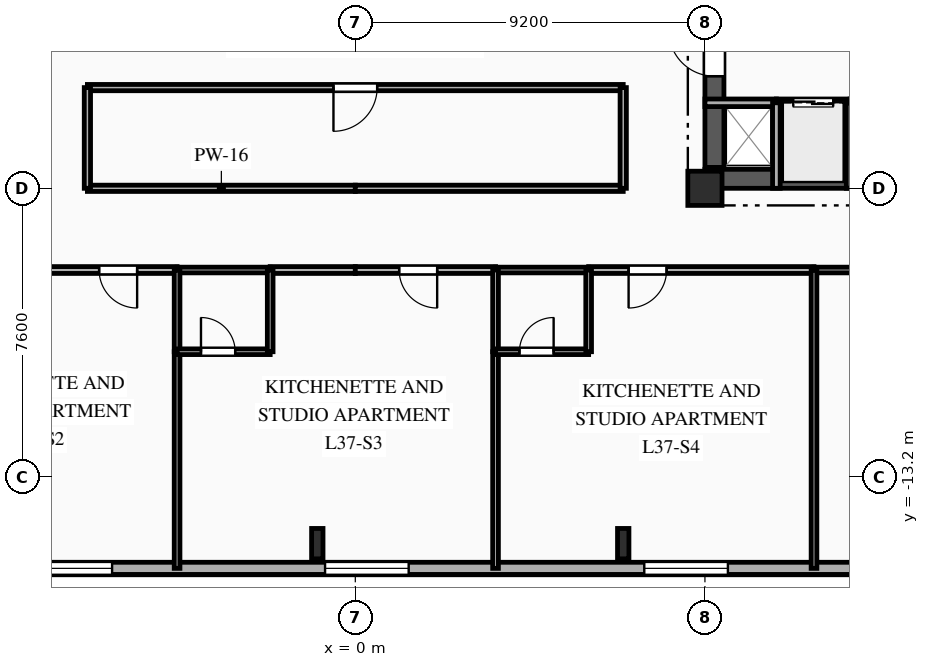
"""IFC4 building model, lengths in metres.
Left out: names, types, materials, properties, quantities, classifications, styles, units other than length and angle.
Written with IfcOpenShell. Run it as: python <this file> out.ifc"""

import sys

from ifc_helpers import new_model, si_unit, direction, frame, frame_2d, origin, origin_2d, place, context, subcontext, project, spatial, rectangle, i_section, extrude, element, fill, save


model = new_model("IFC4")
c1 = context("Model", 3, precision=1e-05, world=origin(), true_north=direction((0.0, 1.0)))
c2 = subcontext(c1, "Body", "Model", "MODEL_VIEW")
j1 = project(units=[si_unit("LENGTHUNIT", "METRE"), si_unit("PLANEANGLEUNIT", "RADIAN")], contexts=[c1])
p1 = place(None, origin())
s1 = spatial("IfcSite", under=j1, at=p1, CompositionType="ELEMENT")
p2 = place(p1, origin())
s2 = spatial("IfcBuilding", under=s1, at=p2, CompositionType="ELEMENT")
p3 = place(p2, frame((0.0, 0.0, 134.35)))
s3 = spatial("IfcBuildingStorey", under=s2, at=p3, CompositionType="ELEMENT", Elevation=134.35)
p4 = place(p3, frame((9.2, -5.6, 0.0), z_axis=(0.0, 0.0, 1.0), x_axis=(1.0, 0.0, 0.0)))
e1 = element("IfcColumn", 1, at=p4, inside=s3, PredefinedType="COLUMN", context=c2, shape_type="SweptSolid", body=[
    extrude(rectangle(XDim=0.9, YDim=0.9, at=origin_2d()), origin(), (0.0, 0.0, 1.0), 3.35),
])
for number, where, z_axis, x_axis in (
    (2, (-1.0, -14.95, 0.0), (0.0, 0.0, 1.0), (1.0, 0.0, 0.0)),
    (3, (7.05, -14.95, 0.0), (0.0, 0.0, 1.0), (1.0, 0.0, 0.0)),
):
    element("IfcColumn", number, at=place(p3, frame(where, z_axis=z_axis, x_axis=x_axis)), inside=s3, PredefinedType="COLUMN", context=c2, shape_type="SweptSolid", body=[
        extrude(i_section(OverallWidth=0.3, OverallDepth=0.8, WebThickness=0.018, FlangeThickness=0.033, FilletRadius=0.03, at=origin_2d()), origin(), (0.0, 0.0, 1.0), 3.35),
    ])
p5 = place(p3, frame((23.8, -15.6, 0.0), z_axis=(0.0, 0.0, 1.0), x_axis=(-1.0, 0.0, 0.0)))
e4 = element("IfcWall", 4, at=p5, inside=s3, PredefinedType="SOLIDWALL", context=c2, shape_type="SweptSolid", body=[
    extrude(rectangle(XDim=49.6, YDim=0.32, at=frame_2d((24.8, 0.0))), origin(), (0.0, 0.0, 1.0), 3.04),
])
p6 = place(p5, frame((1.13, 0.0, 0.85)))
e5 = element("IfcOpeningElement", 5, at=p6, cuts=e4, PredefinedType="OPENING", context=c2, shape_type="SweptSolid", body=[
    extrude(rectangle(XDim=1.1, YDim=1.85, at=frame_2d((0.55, 0.925))), frame((0.0, 0.17, 0.0), z_axis=(0.0, -1.0, 0.0), x_axis=(1.0, 0.0, 0.0)), (0.0, 0.0, 1.0), 0.34),
])
p7 = place(p5, frame((6.495, 0.0, 0.85)))
e6 = element("IfcOpeningElement", 6, at=p7, cuts=e4, PredefinedType="OPENING", context=c2, shape_type="SweptSolid", body=[
    extrude(rectangle(XDim=1.65, YDim=1.85, at=frame_2d((0.825, 0.925))), frame((0.0, 0.17, 0.0), z_axis=(0.0, -1.0, 0.0), x_axis=(1.0, 0.0, 0.0)), (0.0, 0.0, 1.0), 0.34),
])
p8 = place(p5, frame((13.996, 0.0, 0.85)))
e7 = element("IfcOpeningElement", 7, at=p8, cuts=e4, PredefinedType="OPENING", context=c2, shape_type="SweptSolid", body=[
    extrude(rectangle(XDim=2.2, YDim=1.85, at=frame_2d((1.1, 0.925))), frame((0.0, 0.17, 0.0), z_axis=(0.0, -1.0, 0.0), x_axis=(1.0, 0.0, 0.0)), (0.0, 0.0, 1.0), 0.34),
])
p9 = place(p5, frame((22.396, 0.0, 0.85)))
e8 = element("IfcOpeningElement", 8, at=p9, cuts=e4, PredefinedType="OPENING", context=c2, shape_type="SweptSolid", body=[
    extrude(rectangle(XDim=2.2, YDim=1.85, at=frame_2d((1.1, 0.925))), frame((0.0, 0.17, 0.0), z_axis=(0.0, -1.0, 0.0), x_axis=(1.0, 0.0, 0.0)), (0.0, 0.0, 1.0), 0.34),
])
p10 = place(p5, frame((30.2, 0.0, 0.85)))
e9 = element("IfcOpeningElement", 9, at=p10, cuts=e4, PredefinedType="OPENING", context=c2, shape_type="SweptSolid", body=[
    extrude(rectangle(XDim=2.2, YDim=1.85, at=frame_2d((1.1, 0.925))), frame((0.0, 0.17, 0.0), z_axis=(0.0, -1.0, 0.0), x_axis=(1.0, 0.0, 0.0)), (0.0, 0.0, 1.0), 0.34),
])
p11 = place(p5, frame((38.673, 0.0, 0.85)))
e10 = element("IfcOpeningElement", 10, at=p11, cuts=e4, PredefinedType="OPENING", context=c2, shape_type="SweptSolid", body=[
    extrude(rectangle(XDim=1.65, YDim=1.85, at=frame_2d((0.825, 0.925))), frame((0.0, 0.17, 0.0), z_axis=(0.0, -1.0, 0.0), x_axis=(1.0, 0.0, 0.0)), (0.0, 0.0, 1.0), 0.34),
])
p12 = place(p5, frame((46.175, 0.0, 0.85)))
e11 = element("IfcOpeningElement", 11, at=p12, cuts=e4, PredefinedType="OPENING", context=c2, shape_type="SweptSolid", body=[
    extrude(rectangle(XDim=1.65, YDim=1.85, at=frame_2d((0.825, 0.925))), frame((0.0, 0.17, 0.0), z_axis=(0.0, -1.0, 0.0), x_axis=(1.0, 0.0, 0.0)), (0.0, 0.0, 1.0), 0.34),
])
p13 = place(p3, frame((9.2, -5.35, 0.0), z_axis=(0.0, 0.0, 1.0), x_axis=(1.0, 0.0, 0.0)))
e12 = element("IfcWall", 12, at=p13, inside=s3, PredefinedType="SHEAR", context=c2, shape_type="SweptSolid", body=[
    extrude(rectangle(XDim=9.6, YDim=0.5, at=frame_2d((4.8, 0.0))), origin(), (0.0, 0.0, 1.0), 3.04),
])
p14 = place(p13, frame((7.65, 0.0, 0.0)))
e13 = element("IfcOpeningElement", 13, at=p14, cuts=e12, PredefinedType="OPENING", context=c2, shape_type="SweptSolid", body=[
    extrude(rectangle(XDim=0.9, YDim=2.1, at=frame_2d((0.45, 1.05))), frame((0.0, 0.26, 0.0), z_axis=(0.0, -1.0, 0.0), x_axis=(1.0, 0.0, 0.0)), (0.0, 0.0, 1.0), 0.52),
])
p15 = place(p3, frame((9.45, -5.05, 0.0), z_axis=(0.0, 0.0, 1.0), x_axis=(0.0, 1.0, 0.0)))
e14 = element("IfcWall", 14, at=p15, inside=s3, PredefinedType="SHEAR", context=c2, shape_type="SweptSolid", body=[
    extrude(rectangle(XDim=10.1, YDim=0.5, at=frame_2d((5.05, 0.0))), origin(), (0.0, 0.0, 1.0), 3.04),
])
p16 = place(p15, frame((7.15, 0.0, 0.0)))
e15 = element("IfcOpeningElement", 15, at=p16, cuts=e14, PredefinedType="OPENING", context=c2, shape_type="SweptSolid", body=[
    extrude(rectangle(XDim=0.9, YDim=2.1, at=frame_2d((0.45, 1.05))), frame((0.0, 0.26, 0.0), z_axis=(0.0, -1.0, 0.0), x_axis=(1.0, 0.0, 0.0)), (0.0, 0.0, 1.0), 0.52),
])
p17 = place(p15, frame((2.4, 0.0, 0.0)))
e16 = element("IfcOpeningElement", 16, at=p17, cuts=e14, PredefinedType="OPENING", context=c2, shape_type="SweptSolid", body=[
    extrude(rectangle(XDim=1.2, YDim=2.15, at=frame_2d((0.6, 1.075))), frame((0.0, 0.26, 0.0), z_axis=(0.0, -1.0, 0.0), x_axis=(1.0, 0.0, 0.0)), (0.0, 0.0, 1.0), 0.52),
])
p18 = place(p3, frame((9.2, -3.35, 0.0), z_axis=(0.0, 0.0, 1.0), x_axis=(1.0, 0.0, 0.0)))
e17 = element("IfcWall", 17, at=p18, inside=s3, PredefinedType="PARTITIONING", context=c2, shape_type="SweptSolid", body=[
    extrude(rectangle(XDim=1.88, YDim=0.2, at=frame_2d((0.94, 0.0))), origin(), (0.0, 0.0, 1.0), 2.755),
])
p19 = place(p3, frame((11.08, -3.35, 0.0), z_axis=(0.0, 0.0, 1.0), x_axis=(1.0, 0.0, 0.0)))
e18 = element("IfcWall", 18, at=p19, inside=s3, PredefinedType="PARTITIONING", context=c2, shape_type="SweptSolid", body=[
    extrude(rectangle(XDim=1.94, YDim=0.2, at=frame_2d((0.97, 0.0))), origin(), (0.0, 0.0, 1.0), 3.04),
])
p20 = place(p19, frame((0.445, 0.0, 0.0)))
e19 = element("IfcOpeningElement", 19, at=p20, cuts=e18, PredefinedType="OPENING", context=c2, shape_type="SweptSolid", body=[
    extrude(rectangle(XDim=1.05, YDim=2.1, at=frame_2d((0.525, 1.05))), frame((0.0, 0.11, 0.0), z_axis=(0.0, -1.0, 0.0), x_axis=(1.0, 0.0, 0.0)), (0.0, 0.0, 1.0), 0.22),
])
for number, where, z_axis, x_axis in (
    (20, (11.08, -5.6, 0.0), (0.0, 0.0, 1.0), (0.0, 1.0, 0.0)),
    (21, (13.02, -5.6, 0.0), (0.0, 0.0, 1.0), (0.0, 1.0, 0.0)),
):
    element("IfcWall", number, at=place(p3, frame(where, z_axis=z_axis, x_axis=x_axis)), inside=s3, PredefinedType="PARTITIONING", context=c2, shape_type="SweptSolid", body=[
        extrude(rectangle(XDim=2.25, YDim=0.2, at=frame_2d((1.125, 0.0))), origin(), (0.0, 0.0, 1.0), 3.04),
    ])
p21 = place(p3, frame((-4.69, -7.75, 0.0), z_axis=(0.0, 0.0, 1.0), x_axis=(-1.0, 0.0, 0.0)))
e22 = element("IfcWall", 22, at=p21, inside=s3, PredefinedType="PARTITIONING", context=c2, shape_type="SweptSolid", body=[
    extrude(rectangle(XDim=5.93, YDim=0.18, at=frame_2d((2.965, 0.0))), origin(), (0.0, 0.0, 1.0), 3.04),
])
p22 = place(p21, frame((1.051, 0.0, 0.0)))
e23 = element("IfcOpeningElement", 23, at=p22, cuts=e22, PredefinedType="OPENING", context=c2, shape_type="SweptSolid", body=[
    extrude(rectangle(XDim=1.0, YDim=2.15, at=frame_2d((0.5, 1.075))), frame((0.0, 0.1, 0.0), z_axis=(0.0, -1.0, 0.0), x_axis=(1.0, 0.0, 0.0)), (0.0, 0.0, 1.0), 0.2),
])
p23 = place(p3, frame((0.0, -7.75, 0.0), z_axis=(0.0, 0.0, 1.0), x_axis=(-1.0, 0.0, 0.0)))
e24 = element("IfcWall", 24, at=p23, inside=s3, PredefinedType="PARTITIONING", context=c2, shape_type="SweptSolid", body=[
    extrude(rectangle(XDim=2.24, YDim=0.18, at=frame_2d((1.12, 0.0))), origin(), (0.0, 0.0, 1.0), 3.04),
])
p24 = place(p3, frame((-2.24, -7.75, 0.0), z_axis=(0.0, 0.0, 1.0), x_axis=(-1.0, 0.0, 0.0)))
e25 = element("IfcWall", 25, at=p24, inside=s3, PredefinedType="PLUMBINGWALL", context=c2, shape_type="SweptSolid", body=[
    extrude(rectangle(XDim=2.45, YDim=0.15, at=frame_2d((1.225, 0.0))), origin(), (0.0, 0.0, 1.0), 3.04),
])
p25 = place(p3, frame((-7.05, -5.6, 0.0), z_axis=(0.0, 0.0, 1.0), x_axis=(1.0, 0.0, 0.0)))
e26 = element("IfcWall", 26, at=p25, inside=s3, PredefinedType="PARTITIONING", context=c2, shape_type="SweptSolid", body=[
    extrude(rectangle(XDim=7.05, YDim=0.165, at=frame_2d((3.525, 0.0))), origin(), (0.0, 0.0, 1.0), 2.525),
])
p26 = place(p3, frame((3.69, -7.75, 0.0), z_axis=(0.0, 0.0, 1.0), x_axis=(-1.0, 0.0, 0.0)))
e27 = element("IfcWall", 27, at=p26, inside=s3, PredefinedType="PARTITIONING", context=c2, shape_type="SweptSolid", body=[
    extrude(rectangle(XDim=3.69, YDim=0.18, at=frame_2d((1.845, 0.0))), origin(), (0.0, 0.0, 1.0), 3.04),
])
p27 = place(p26, frame((1.536, 0.0, 0.0)))
e28 = element("IfcOpeningElement", 28, at=p27, cuts=e27, PredefinedType="OPENING", context=c2, shape_type="SweptSolid", body=[
    extrude(rectangle(XDim=1.0, YDim=2.15, at=frame_2d((0.5, 1.075))), frame((0.0, 0.1, 0.0), z_axis=(0.0, -1.0, 0.0), x_axis=(1.0, 0.0, 0.0)), (0.0, 0.0, 1.0), 0.2),
])
p28 = place(p3, frame((12.07, -7.75, 0.0), z_axis=(0.0, 0.0, 1.0), x_axis=(-1.0, 0.0, 0.0)))
e29 = element("IfcWall", 29, at=p28, inside=s3, PredefinedType="PARTITIONING", context=c2, shape_type="SweptSolid", body=[
    extrude(rectangle(XDim=5.93, YDim=0.18, at=frame_2d((2.965, 0.0))), origin(), (0.0, 0.0, 1.0), 3.04),
])
p29 = place(p28, frame((3.879, 0.0, 0.0)))
e30 = element("IfcOpeningElement", 30, at=p29, cuts=e29, PredefinedType="OPENING", context=c2, shape_type="SweptSolid", body=[
    extrude(rectangle(XDim=1.0, YDim=2.15, at=frame_2d((0.5, 1.075))), frame((0.0, 0.1, 0.0), z_axis=(0.0, -1.0, 0.0), x_axis=(1.0, 0.0, 0.0)), (0.0, 0.0, 1.0), 0.2),
])
p30 = place(p3, frame((6.14, -7.75, 0.0), z_axis=(0.0, 0.0, 1.0), x_axis=(-1.0, 0.0, 0.0)))
e31 = element("IfcWall", 31, at=p30, inside=s3, PredefinedType="PLUMBINGWALL", context=c2, shape_type="SweptSolid", body=[
    extrude(rectangle(XDim=2.45, YDim=0.15, at=frame_2d((1.225, 0.0))), origin(), (0.0, 0.0, 1.0), 3.04),
])
p31 = place(p3, frame((20.95, -7.75, 0.0), z_axis=(0.0, 0.0, 1.0), x_axis=(-1.0, 0.0, 0.0)))
e32 = element("IfcWall", 32, at=p31, inside=s3, PredefinedType="PARTITIONING", context=c2, shape_type="SweptSolid", body=[
    extrude(rectangle(XDim=8.88, YDim=0.15, at=frame_2d((4.44, 0.0))), origin(), (0.0, 0.0, 1.0), 3.04),
])
p32 = place(p31, frame((6.416, 0.0, 0.0)))
e33 = element("IfcOpeningElement", 33, at=p32, cuts=e32, PredefinedType="OPENING", context=c2, shape_type="SweptSolid", body=[
    extrude(rectangle(XDim=1.05, YDim=2.15, at=frame_2d((0.525, 1.075))), frame((0.0, 0.085, 0.0), z_axis=(0.0, -1.0, 0.0), x_axis=(1.0, 0.0, 0.0)), (0.0, 0.0, 1.0), 0.17),
])
p33 = place(p3, frame((0.0, -5.6, 0.0), z_axis=(0.0, 0.0, 1.0), x_axis=(1.0, 0.0, 0.0)))
e34 = element("IfcWall", 34, at=p33, inside=s3, PredefinedType="PARTITIONING", context=c2, shape_type="SweptSolid", body=[
    extrude(rectangle(XDim=7.05, YDim=0.165, at=frame_2d((3.525, 0.0))), origin(), (0.0, 0.0, 1.0), 2.525),
])
p34 = place(p3, frame((7.05, -2.95, 0.0), z_axis=(0.0, 0.0, 1.0), x_axis=(-1.0, 0.0, 0.0)))
e35 = element("IfcWall", 35, at=p34, inside=s3, PredefinedType="PARTITIONING", context=c2, shape_type="SweptSolid", body=[
    extrude(rectangle(XDim=14.1, YDim=0.165, at=frame_2d((7.05, 0.0))), origin(), (0.0, 0.0, 1.0), 3.04),
])
p35 = place(p34, frame((6.475, 0.0, 0.0)))
e36 = element("IfcOpeningElement", 36, at=p35, cuts=e35, PredefinedType="OPENING", context=c2, shape_type="SweptSolid", body=[
    extrude(rectangle(XDim=1.15, YDim=2.15, at=frame_2d((0.575, 1.075))), frame((0.0, 0.093, 0.0), z_axis=(0.0, -1.0, 0.0), x_axis=(1.0, 0.0, 0.0)), (0.0, 0.0, 1.0), 0.185),
])
for number, where, z_axis, x_axis in (
    (37, (-7.05, -2.95, 0.0), (0.0, 0.0, 1.0), (0.0, -1.0, 0.0)),
    (38, (7.05, -5.6, 0.0), (0.0, 0.0, 1.0), (0.0, 1.0, 0.0)),
):
    element("IfcWall", number, at=place(p3, frame(where, z_axis=z_axis, x_axis=x_axis)), inside=s3, PredefinedType="PARTITIONING", context=c2, shape_type="SweptSolid", body=[
        extrude(rectangle(XDim=2.65, YDim=0.165, at=frame_2d((1.325, 0.0))), origin(), (0.0, 0.0, 1.0), 3.04),
    ])
p36 = place(p3, frame((-4.69, -9.9, 0.0), z_axis=(0.0, 0.0, 1.0), x_axis=(0.0, -1.0, 0.0)))
e39 = element("IfcWall", 39, at=p36, inside=s3, PredefinedType="PARTITIONING", context=c2, shape_type="SweptSolid", body=[
    extrude(rectangle(XDim=5.7, YDim=0.15, at=frame_2d((2.85, 0.0))), origin(), (0.0, 0.0, 1.0), 3.04),
])
p37 = place(p3, frame((-4.69, -7.75, 0.0), z_axis=(0.0, 0.0, 1.0), x_axis=(0.0, -1.0, 0.0)))
e40 = element("IfcWall", 40, at=p37, inside=s3, PredefinedType="PLUMBINGWALL", context=c2, shape_type="SweptSolid", body=[
    extrude(rectangle(XDim=2.15, YDim=0.15, at=frame_2d((1.075, 0.0))), origin(), (0.0, 0.0, 1.0), 3.04),
])
p38 = place(p3, frame((-4.69, -9.9, 0.0), z_axis=(0.0, 0.0, 1.0), x_axis=(1.0, 0.0, 0.0)))
e41 = element("IfcWall", 41, at=p38, inside=s3, PredefinedType="PLUMBINGWALL", context=c2, shape_type="SweptSolid", body=[
    extrude(rectangle(XDim=2.45, YDim=0.15, at=frame_2d((1.225, 0.0))), origin(), (0.0, 0.0, 1.0), 3.04),
])
p39 = place(p38, frame((0.629, 0.0, 0.0)))
e42 = element("IfcOpeningElement", 42, at=p39, cuts=e41, PredefinedType="OPENING", context=c2, shape_type="SweptSolid", body=[
    extrude(rectangle(XDim=0.9, YDim=2.1, at=frame_2d((0.45, 1.05))), frame((0.0, 0.085, 0.0), z_axis=(0.0, -1.0, 0.0), x_axis=(1.0, 0.0, 0.0)), (0.0, 0.0, 1.0), 0.17),
])
p40 = place(p3, frame((-2.24, -9.9, 0.0), z_axis=(0.0, 0.0, 1.0), x_axis=(0.0, 1.0, 0.0)))
e43 = element("IfcWall", 43, at=p40, inside=s3, PredefinedType="PLUMBINGWALL", context=c2, shape_type="SweptSolid", body=[
    extrude(rectangle(XDim=2.15, YDim=0.15, at=frame_2d((1.075, 0.0))), origin(), (0.0, 0.0, 1.0), 3.04),
])
p41 = place(p3, frame((3.69, -9.9, 0.0), z_axis=(0.0, 0.0, 1.0), x_axis=(0.0, -1.0, 0.0)))
e44 = element("IfcWall", 44, at=p41, inside=s3, PredefinedType="PARTITIONING", context=c2, shape_type="SweptSolid", body=[
    extrude(rectangle(XDim=5.7, YDim=0.15, at=frame_2d((2.85, 0.0))), origin(), (0.0, 0.0, 1.0), 3.04),
])
p42 = place(p3, frame((3.69, -7.75, 0.0), z_axis=(0.0, 0.0, 1.0), x_axis=(0.0, -1.0, 0.0)))
e45 = element("IfcWall", 45, at=p42, inside=s3, PredefinedType="PLUMBINGWALL", context=c2, shape_type="SweptSolid", body=[
    extrude(rectangle(XDim=2.15, YDim=0.15, at=frame_2d((1.075, 0.0))), origin(), (0.0, 0.0, 1.0), 3.04),
])
p43 = place(p3, frame((3.69, -9.9, 0.0), z_axis=(0.0, 0.0, 1.0), x_axis=(1.0, 0.0, 0.0)))
e46 = element("IfcWall", 46, at=p43, inside=s3, PredefinedType="PLUMBINGWALL", context=c2, shape_type="SweptSolid", body=[
    extrude(rectangle(XDim=2.45, YDim=0.15, at=frame_2d((1.225, 0.0))), origin(), (0.0, 0.0, 1.0), 3.04),
])
p44 = place(p43, frame((0.629, 0.0, 0.0)))
e47 = element("IfcOpeningElement", 47, at=p44, cuts=e46, PredefinedType="OPENING", context=c2, shape_type="SweptSolid", body=[
    extrude(rectangle(XDim=0.9, YDim=2.1, at=frame_2d((0.45, 1.05))), frame((0.0, 0.085, 0.0), z_axis=(0.0, -1.0, 0.0), x_axis=(1.0, 0.0, 0.0)), (0.0, 0.0, 1.0), 0.17),
])
p45 = place(p3, frame((6.14, -9.9, 0.0), z_axis=(0.0, 0.0, 1.0), x_axis=(0.0, 1.0, 0.0)))
e48 = element("IfcWall", 48, at=p45, inside=s3, PredefinedType="PLUMBINGWALL", context=c2, shape_type="SweptSolid", body=[
    extrude(rectangle(XDim=2.15, YDim=0.15, at=frame_2d((1.075, 0.0))), origin(), (0.0, 0.0, 1.0), 3.04),
])
p46 = place(p3, frame((12.07, -7.75, 0.0), z_axis=(0.0, 0.0, 1.0), x_axis=(0.0, -1.0, 0.0)))
e49 = element("IfcWall", 49, at=p46, inside=s3, PredefinedType="PARTITIONING", context=c2, shape_type="SweptSolid", body=[
    extrude(rectangle(XDim=7.85, YDim=0.15, at=frame_2d((3.925, 0.0))), origin(), (0.0, 0.0, 1.0), 3.04),
])
p47 = place(p8, origin())
e50 = element("IfcWindow", 50, at=p47, inside=s3, PartitioningType="SINGLE_PANEL", PredefinedType="WINDOW", context=c2, shape_type="SweptSolid", body=[
    extrude(rectangle(XDim=2.2, YDim=1.85, at=frame_2d((1.1, 0.925))), frame((0.0, 0.03, 0.0), z_axis=(0.0, -1.0, 0.0), x_axis=(1.0, 0.0, 0.0)), (0.0, 0.0, 1.0), 0.06),
])
fill(e7, e50)
p48 = place(p9, origin())
e51 = element("IfcWindow", 51, at=p48, inside=s3, PartitioningType="SINGLE_PANEL", PredefinedType="WINDOW", context=c2, shape_type="SweptSolid", body=[
    extrude(rectangle(XDim=2.2, YDim=1.85, at=frame_2d((1.1, 0.925))), frame((0.0, 0.03, 0.0), z_axis=(0.0, -1.0, 0.0), x_axis=(1.0, 0.0, 0.0)), (0.0, 0.0, 1.0), 0.06),
])
fill(e8, e51)
p49 = place(p10, origin())
e52 = element("IfcWindow", 52, at=p49, inside=s3, PartitioningType="SINGLE_PANEL", PredefinedType="WINDOW", context=c2, shape_type="SweptSolid", body=[
    extrude(rectangle(XDim=2.2, YDim=1.85, at=frame_2d((1.1, 0.925))), frame((0.0, 0.03, 0.0), z_axis=(0.0, -1.0, 0.0), x_axis=(1.0, 0.0, 0.0)), (0.0, 0.0, 1.0), 0.06),
])
fill(e9, e52)
p50 = place(p20, origin())
e53 = element("IfcDoor", 53, at=p50, inside=s3, OperationType="DOUBLE_DOOR_SLIDING", PredefinedType="DOOR", context=c2, shape_type="SweptSolid", body=[
    extrude(rectangle(XDim=1.05, YDim=2.1, at=frame_2d((0.525, 1.05))), frame((0.0, 0.025, 0.0), z_axis=(0.0, -1.0, 0.0), x_axis=(1.0, 0.0, 0.0)), (0.0, 0.0, 1.0), 0.05),
])
fill(e19, e53)
p51 = place(p17, origin())
e54 = element("IfcDoor", 54, at=p51, inside=s3, OperationType="SINGLE_SWING_RIGHT", PredefinedType="DOOR", context=c2, shape_type="SweptSolid", body=[
    extrude(rectangle(XDim=1.2, YDim=2.15, at=frame_2d((0.6, 1.075))), frame((0.0, 0.025, 0.0), z_axis=(0.0, -1.0, 0.0), x_axis=(1.0, 0.0, 0.0)), (0.0, 0.0, 1.0), 0.05),
])
fill(e16, e54)
p52 = place(p22, origin())
e55 = element("IfcDoor", 55, at=p52, inside=s3, OperationType="SINGLE_SWING_LEFT", PredefinedType="DOOR", context=c2, shape_type="SweptSolid", body=[
    extrude(rectangle(XDim=1.0, YDim=2.15, at=frame_2d((0.5, 1.075))), frame((0.0, 0.025, 0.0), z_axis=(0.0, -1.0, 0.0), x_axis=(1.0, 0.0, 0.0)), (0.0, 0.0, 1.0), 0.05),
])
fill(e23, e55)
p53 = place(p27, origin())
e56 = element("IfcDoor", 56, at=p53, inside=s3, OperationType="SINGLE_SWING_LEFT", PredefinedType="DOOR", context=c2, shape_type="SweptSolid", body=[
    extrude(rectangle(XDim=1.0, YDim=2.15, at=frame_2d((0.5, 1.075))), frame((0.0, 0.025, 0.0), z_axis=(0.0, -1.0, 0.0), x_axis=(1.0, 0.0, 0.0)), (0.0, 0.0, 1.0), 0.05),
])
fill(e28, e56)
p54 = place(p29, origin())
e57 = element("IfcDoor", 57, at=p54, inside=s3, OperationType="SINGLE_SWING_RIGHT", PredefinedType="DOOR", context=c2, shape_type="SweptSolid", body=[
    extrude(rectangle(XDim=1.0, YDim=2.15, at=frame_2d((0.5, 1.075))), frame((0.0, 0.025, 0.0), z_axis=(0.0, -1.0, 0.0), x_axis=(1.0, 0.0, 0.0)), (0.0, 0.0, 1.0), 0.05),
])
fill(e30, e57)
p55 = place(p35, origin())
e58 = element("IfcDoor", 58, at=p55, inside=s3, OperationType="SINGLE_SWING_RIGHT", PredefinedType="DOOR", context=c2, shape_type="SweptSolid", body=[
    extrude(rectangle(XDim=1.15, YDim=2.15, at=frame_2d((0.575, 1.075))), frame((0.0, 0.025, 0.0), z_axis=(0.0, -1.0, 0.0), x_axis=(1.0, 0.0, 0.0)), (0.0, 0.0, 1.0), 0.05),
])
fill(e36, e58)
p56 = place(p39, origin())
e59 = element("IfcDoor", 59, at=p56, inside=s3, OperationType="SINGLE_SWING_LEFT", PredefinedType="DOOR", context=c2, shape_type="SweptSolid", body=[
    extrude(rectangle(XDim=0.9, YDim=2.1, at=frame_2d((0.45, 1.05))), frame((0.0, 0.025, 0.0), z_axis=(0.0, -1.0, 0.0), x_axis=(1.0, 0.0, 0.0)), (0.0, 0.0, 1.0), 0.05),
])
fill(e42, e59)
p57 = place(p44, origin())
e60 = element("IfcDoor", 60, at=p57, inside=s3, OperationType="SINGLE_SWING_RIGHT", PredefinedType="DOOR", context=c2, shape_type="SweptSolid", body=[
    extrude(rectangle(XDim=0.9, YDim=2.1, at=frame_2d((0.45, 1.05))), frame((0.0, 0.025, 0.0), z_axis=(0.0, -1.0, 0.0), x_axis=(1.0, 0.0, 0.0)), (0.0, 0.0, 1.0), 0.05),
])
fill(e47, e60)
save(model, sys.argv[1])
